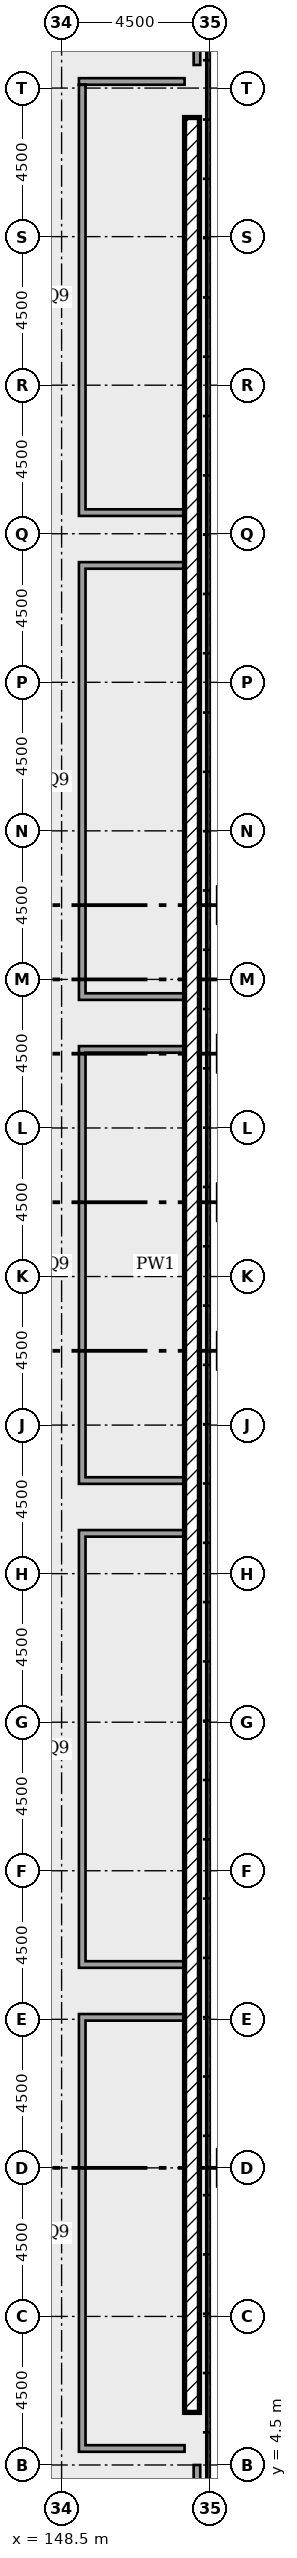
"""IFC4 building model, lengths in metres.
Left out: names, types, materials, properties, quantities, classifications, styles, units other than length and angle.
Written with IfcOpenShell. Run it as: python <this file> out.ifc"""

import sys

from ifc_helpers import new_model, si_unit, direction, frame, frame_2d, origin, place, context, subcontext, project, spatial, rectangle, extrude, element, save


model = new_model("IFC4")
c1 = context("Model", 3, precision=1e-05, world=origin(), true_north=direction((0.0, 1.0)))
c2 = subcontext(c1, "Body", "Model", "MODEL_VIEW")
j1 = project(units=[si_unit("LENGTHUNIT", "METRE"), si_unit("PLANEANGLEUNIT", "RADIAN")], contexts=[c1])
p1 = place(None, origin())
s1 = spatial("IfcSite", under=j1, at=p1, CompositionType="ELEMENT")
p2 = place(p1, origin())
s2 = spatial("IfcBuilding", under=s1, at=p2, CompositionType="ELEMENT")
p3 = place(p2, frame((0.0, 0.0, 6.0)))
s3 = spatial("IfcBuildingStorey", under=s2, at=p3, CompositionType="ELEMENT", Elevation=6.0)
p4 = place(p3, frame((152.45, 6.093, 0.0), z_axis=(0.0, 0.0, 1.0), x_axis=(0.0, 1.0, 0.0)))
e1 = element("IfcWall", 1, at=p4, inside=s3, PredefinedType="SOLIDWALL", context=c2, shape_type="SweptSolid", body=[
    extrude(rectangle(XDim=69.515, YDim=0.45, at=frame_2d((34.757, 0.0))), origin(), (0.0, 0.0, 1.0), 0.6),
])
for number, where in (
    (2, (149.025, 18.06, 0.0)),
    (3, (149.025, 5.0, 0.0)),
):
    element("IfcWall", number, at=place(p3, frame(where)), inside=s3, PredefinedType="SOLIDWALL", context=c2, shape_type="SweptSolid", body=[
        extrude(rectangle(XDim=3.2, YDim=0.2, at=frame_2d((1.6, 0.0))), origin(), (0.0, 0.0, 1.0), 0.45),
    ])
p5 = place(p3, frame((149.125, 5.1, 0.0), z_axis=(0.0, 0.0, 1.0), x_axis=(0.0, 1.0, 0.0)))
e4 = element("IfcWall", 4, at=p5, inside=s3, PredefinedType="SOLIDWALL", context=c2, shape_type="SweptSolid", body=[
    extrude(rectangle(XDim=12.86, YDim=0.2, at=frame_2d((6.43, 0.0))), origin(), (0.0, 0.0, 1.0), 0.45),
])
for number, where in (
    (5, (149.025, 32.72, 0.0)),
    (6, (149.025, 19.66, 0.0)),
):
    element("IfcWall", number, at=place(p3, frame(where)), inside=s3, PredefinedType="SOLIDWALL", context=c2, shape_type="SweptSolid", body=[
        extrude(rectangle(XDim=3.2, YDim=0.2, at=frame_2d((1.6, 0.0))), origin(), (0.0, 0.0, 1.0), 0.45),
    ])
p6 = place(p3, frame((149.125, 19.76, 0.0), z_axis=(0.0, 0.0, 1.0), x_axis=(0.0, 1.0, 0.0)))
e7 = element("IfcWall", 7, at=p6, inside=s3, PredefinedType="SOLIDWALL", context=c2, shape_type="SweptSolid", body=[
    extrude(rectangle(XDim=12.86, YDim=0.2, at=frame_2d((6.43, 0.0))), origin(), (0.0, 0.0, 1.0), 0.45),
])
for number, where in (
    (8, (149.025, 47.38, 0.0)),
    (9, (149.025, 34.32, 0.0)),
):
    element("IfcWall", number, at=place(p3, frame(where)), inside=s3, PredefinedType="SOLIDWALL", context=c2, shape_type="SweptSolid", body=[
        extrude(rectangle(XDim=3.2, YDim=0.2, at=frame_2d((1.6, 0.0))), origin(), (0.0, 0.0, 1.0), 0.45),
    ])
p7 = place(p3, frame((149.125, 34.42, 0.0), z_axis=(0.0, 0.0, 1.0), x_axis=(0.0, 1.0, 0.0)))
e10 = element("IfcWall", 10, at=p7, inside=s3, PredefinedType="SOLIDWALL", context=c2, shape_type="SweptSolid", body=[
    extrude(rectangle(XDim=12.86, YDim=0.2, at=frame_2d((6.43, 0.0))), origin(), (0.0, 0.0, 1.0), 0.45),
])
for number, where in (
    (11, (149.025, 62.04, 0.0)),
    (12, (149.025, 48.98, 0.0)),
):
    element("IfcWall", number, at=place(p3, frame(where)), inside=s3, PredefinedType="SOLIDWALL", context=c2, shape_type="SweptSolid", body=[
        extrude(rectangle(XDim=3.2, YDim=0.2, at=frame_2d((1.6, 0.0))), origin(), (0.0, 0.0, 1.0), 0.45),
    ])
p8 = place(p3, frame((149.125, 49.08, 0.0), z_axis=(0.0, 0.0, 1.0), x_axis=(0.0, 1.0, 0.0)))
e13 = element("IfcWall", 13, at=p8, inside=s3, PredefinedType="SOLIDWALL", context=c2, shape_type="SweptSolid", body=[
    extrude(rectangle(XDim=12.86, YDim=0.2, at=frame_2d((6.43, 0.0))), origin(), (0.0, 0.0, 1.0), 0.45),
])
for number, where in (
    (14, (149.025, 76.7, 0.0)),
    (15, (149.025, 63.64, 0.0)),
):
    element("IfcWall", number, at=place(p3, frame(where)), inside=s3, PredefinedType="SOLIDWALL", context=c2, shape_type="SweptSolid", body=[
        extrude(rectangle(XDim=3.2, YDim=0.2, at=frame_2d((1.6, 0.0))), origin(), (0.0, 0.0, 1.0), 0.45),
    ])
p9 = place(p3, frame((149.125, 63.74, 0.0), z_axis=(0.0, 0.0, 1.0), x_axis=(0.0, 1.0, 0.0)))
e16 = element("IfcWall", 16, at=p9, inside=s3, PredefinedType="SOLIDWALL", context=c2, shape_type="SweptSolid", body=[
    extrude(rectangle(XDim=12.86, YDim=0.2, at=frame_2d((6.43, 0.0))), origin(), (0.0, 0.0, 1.0), 0.45),
])
p10 = place(p3, frame((152.6, 77.2, 0.0), z_axis=(0.0, 0.0, 1.0), x_axis=(0.0, 1.0, 0.0)))
e17 = element("IfcWall", 17, at=p10, inside=s3, PredefinedType="SOLIDWALL", context=c2, shape_type="SweptSolid", body=[
    extrude(rectangle(XDim=3.8, YDim=0.2, at=frame_2d((1.9, 0.0))), origin(), (0.0, 0.0, 1.0), 2.3),
])
p11 = place(p10, frame((0.6, 0.0, 0.0)))
e18 = element("IfcOpeningElement", 18, at=p11, cuts=e17, PredefinedType="OPENING", context=c2, shape_type="SweptSolid", body=[
    extrude(rectangle(XDim=2.6, YDim=2.1, at=frame_2d((1.3, 1.05))), frame((0.0, 0.11, 0.0), z_axis=(0.0, -1.0, 0.0), x_axis=(1.0, 0.0, 0.0)), (0.0, 0.0, 1.0), 0.22),
])
p12 = place(p3, frame((152.6, 0.7, 0.0), z_axis=(0.0, 0.0, 1.0), x_axis=(0.0, 1.0, 0.0)))
e19 = element("IfcWall", 19, at=p12, inside=s3, PredefinedType="SOLIDWALL", context=c2, shape_type="SweptSolid", body=[
    extrude(rectangle(XDim=3.8, YDim=0.2, at=frame_2d((1.9, 0.0))), origin(), (0.0, 0.0, 1.0), 2.3),
])
p13 = place(p12, frame((0.6, 0.0, 0.0)))
e20 = element("IfcOpeningElement", 20, at=p13, cuts=e19, PredefinedType="OPENING", context=c2, shape_type="SweptSolid", body=[
    extrude(rectangle(XDim=2.6, YDim=2.1, at=frame_2d((1.3, 1.05))), frame((0.0, 0.11, 0.0), z_axis=(0.0, -1.0, 0.0), x_axis=(1.0, 0.0, 0.0)), (0.0, 0.0, 1.0), 0.22),
])
save(model, sys.argv[1])
